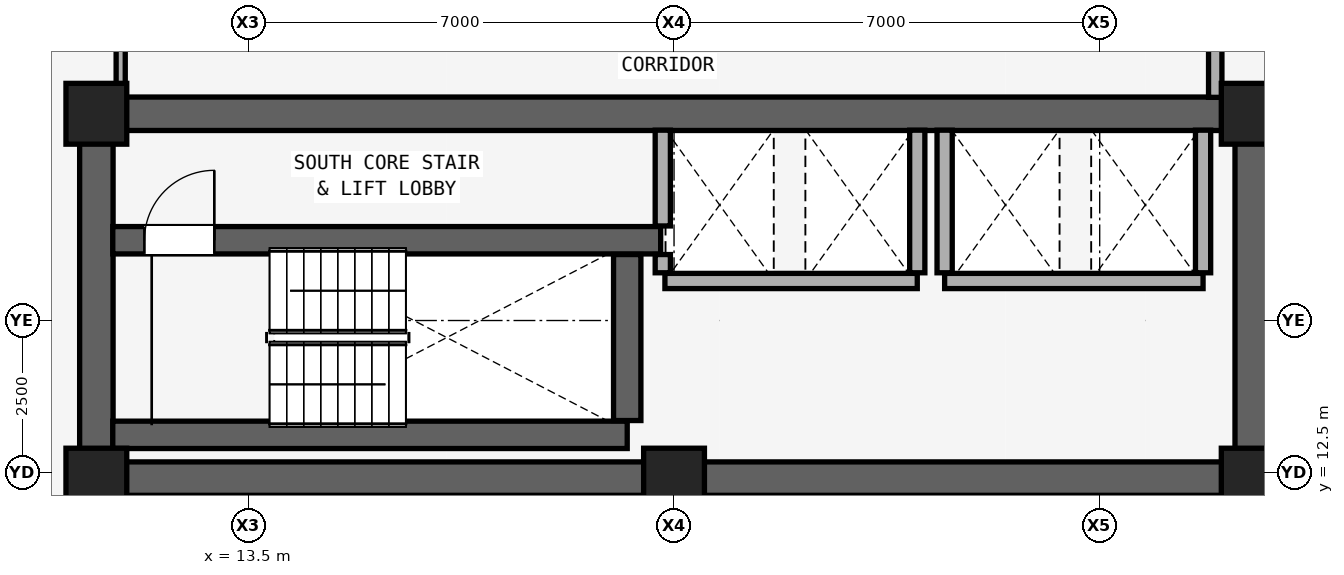
"""IFC4 building model, lengths in metres.
Left out: names, types, materials, properties, quantities, classifications, styles, units other than length and angle.
Written with IfcOpenShell. Run it as: python <this file> out.ifc"""

import sys

from ifc_helpers import new_model, si_unit, direction, frame, frame_2d, origin, origin_2d, place, context, subcontext, project, spatial, rectangle, extrude, element, fill, save


model = new_model("IFC4")
c1 = context("Model", 3, precision=1e-05, world=origin(), true_north=direction((0.0, 1.0)))
c2 = subcontext(c1, "Body", "Model", "MODEL_VIEW")
j1 = project(units=[si_unit("LENGTHUNIT", "METRE"), si_unit("PLANEANGLEUNIT", "RADIAN")], contexts=[c1])
p1 = place(None, origin())
s1 = spatial("IfcSite", under=j1, at=p1, CompositionType="ELEMENT")
p2 = place(p1, origin())
s2 = spatial("IfcBuilding", under=s1, at=p2, CompositionType="ELEMENT")
p3 = place(p2, frame((0.0, 0.0, 147.8)))
s3 = spatial("IfcBuildingStorey", under=s2, at=p3, CompositionType="ELEMENT", Elevation=147.8)
for number, where, z_axis, x_axis in (
    (1, (11.0, 12.4, 0.0), (0.0, 0.0, 1.0), (1.0, 0.0, 0.0)),
    (2, (20.5, 12.4, 0.0), (0.0, 0.0, 1.0), (1.0, 0.0, 0.0)),
    (3, (30.0, 12.4, 0.0), (0.0, 0.0, 1.0), (1.0, 0.0, 0.0)),
    (4, (11.0, 18.4, 0.0), (0.0, 0.0, 1.0), (1.0, 0.0, 0.0)),
    (5, (30.0, 18.4, 0.0), (0.0, 0.0, 1.0), (1.0, 0.0, 0.0)),
):
    element("IfcColumn", number, at=place(p3, frame(where, z_axis=z_axis, x_axis=x_axis)), inside=s3, PredefinedType="COLUMN", context=c2, shape_type="SweptSolid", body=[
        extrude(rectangle(XDim=1.0, YDim=1.0, at=origin_2d()), origin(), (0.0, 0.0, 1.0), 6.6),
    ])
p4 = place(p3, frame((11.0, 12.4, 0.0), z_axis=(0.0, 0.0, 1.0), x_axis=(1.0, 0.0, 0.0)))
e6 = element("IfcWall", 6, at=p4, inside=s3, PredefinedType="SHEAR", context=c2, shape_type="SweptSolid", body=[
    extrude(rectangle(XDim=19.0, YDim=0.55, at=frame_2d((9.5, 0.0))), origin(), (0.0, 0.0, 1.0), 6.4),
])
for number, where, z_axis, x_axis in (
    (7, (11.0, 12.4, 0.0), (0.0, 0.0, 1.0), (0.0, 1.0, 0.0)),
    (8, (30.0, 12.4, 0.0), (0.0, 0.0, 1.0), (0.0, 1.0, 0.0)),
):
    element("IfcWall", number, at=place(p3, frame(where, z_axis=z_axis, x_axis=x_axis)), inside=s3, PredefinedType="SHEAR", context=c2, shape_type="SweptSolid", body=[
        extrude(rectangle(XDim=6.0, YDim=0.55, at=frame_2d((3.0, 0.0))), origin(), (0.0, 0.0, 1.0), 6.4),
    ])
p5 = place(p3, frame((11.0, 18.4, 0.0), z_axis=(0.0, 0.0, 1.0), x_axis=(1.0, 0.0, 0.0)))
e9 = element("IfcWall", 9, at=p5, inside=s3, PredefinedType="SHEAR", context=c2, shape_type="SweptSolid", body=[
    extrude(rectangle(XDim=19.0, YDim=0.55, at=frame_2d((9.5, 0.0))), origin(), (0.0, 0.0, 1.0), 6.4),
])
p6 = place(p3, frame((11.27, 13.12, 0.0), z_axis=(0.0, 0.0, 1.0), x_axis=(1.0, 0.0, 0.0)))
e10 = element("IfcWall", 10, at=p6, inside=s3, PredefinedType="SHEAR", context=c2, shape_type="SweptSolid", body=[
    extrude(rectangle(XDim=8.46, YDim=0.45, at=frame_2d((4.23, 0.0))), origin(), (0.0, 0.0, 1.0), 6.4),
])
p7 = place(p3, frame((20.35, 15.65, 0.0), z_axis=(0.0, 0.0, 1.0), x_axis=(1.0, 0.0, 0.0)))
e11 = element("IfcWall", 11, at=p7, inside=s3, PredefinedType="SOLIDWALL", context=c2, shape_type="SweptSolid", body=[
    extrude(rectangle(XDim=4.15, YDim=0.25, at=frame_2d((2.075, 0.0))), origin(), (0.0, 0.0, 1.0), 6.4),
])
p8 = place(p3, frame((24.95, 15.65, 0.0), z_axis=(0.0, 0.0, 1.0), x_axis=(1.0, 0.0, 0.0)))
e12 = element("IfcWall", 12, at=p8, inside=s3, PredefinedType="SOLIDWALL", context=c2, shape_type="SweptSolid", body=[
    extrude(rectangle(XDim=4.25, YDim=0.25, at=frame_2d((2.125, 0.0))), origin(), (0.0, 0.0, 1.0), 6.4),
])
p9 = place(p3, frame((11.27, 16.32, 0.0), z_axis=(0.0, 0.0, 1.0), x_axis=(1.0, 0.0, 0.0)))
e13 = element("IfcWall", 13, at=p9, inside=s3, PredefinedType="SHEAR", context=c2, shape_type="SweptSolid", body=[
    extrude(rectangle(XDim=9.01, YDim=0.45, at=frame_2d((4.505, 0.0))), origin(), (0.0, 0.0, 1.0), 6.4),
])
p10 = place(p9, frame((0.52, 0.0, 0.0)))
e14 = element("IfcOpeningElement", 14, at=p10, cuts=e13, PredefinedType="OPENING", context=c2, shape_type="SweptSolid", body=[
    extrude(rectangle(XDim=1.15, YDim=2.2, at=frame_2d((0.575, 1.1))), frame((0.0, 0.235, 0.0), z_axis=(0.0, -1.0, 0.0), x_axis=(1.0, 0.0, 0.0)), (0.0, 0.0, 1.0), 0.47),
])
p11 = place(p3, frame((11.4, 18.67, 0.0), z_axis=(0.0, 0.0, 1.0), x_axis=(0.0, 1.0, 0.0)))
e15 = element("IfcWall", 15, at=p11, inside=s3, PredefinedType="PARTITIONING", context=c2, shape_type="SweptSolid", body=[
    extrude(rectangle(XDim=1.945, YDim=0.15, at=frame_2d((0.973, 0.0))), origin(), (0.0, 0.0, 1.0), 6.4),
])
p12 = place(p3, frame((19.73, 13.355, 0.0), z_axis=(0.0, 0.0, 1.0), x_axis=(0.0, 1.0, 0.0)))
e16 = element("IfcWall", 16, at=p12, inside=s3, PredefinedType="SHEAR", context=c2, shape_type="SweptSolid", body=[
    extrude(rectangle(XDim=2.73, YDim=0.45, at=frame_2d((1.365, 0.0))), origin(), (0.0, 0.0, 1.0), 6.4),
])
p13 = place(p3, frame((20.315, 15.785, 0.0), z_axis=(0.0, 0.0, 1.0), x_axis=(0.0, 1.0, 0.0)))
e17 = element("IfcWall", 17, at=p13, inside=s3, PredefinedType="SOLIDWALL", context=c2, shape_type="SweptSolid", body=[
    extrude(rectangle(XDim=0.3, YDim=0.25, at=frame_2d((0.15, 0.0))), origin(), (0.0, 0.0, 1.0), 6.4),
])
p14 = place(p3, frame((20.315, 16.555, 0.0), z_axis=(0.0, 0.0, 1.0), x_axis=(0.0, 1.0, 0.0)))
e18 = element("IfcWall", 18, at=p14, inside=s3, PredefinedType="SOLIDWALL", context=c2, shape_type="SweptSolid", body=[
    extrude(rectangle(XDim=1.575, YDim=0.25, at=frame_2d((0.788, 0.0))), origin(), (0.0, 0.0, 1.0), 6.4),
])
for number, where, z_axis, x_axis in (
    (19, (24.5, 15.785, 0.0), (0.0, 0.0, 1.0), (0.0, 1.0, 0.0)),
    (20, (24.95, 15.785, 0.0), (0.0, 0.0, 1.0), (0.0, 1.0, 0.0)),
    (21, (29.2, 15.785, 0.0), (0.0, 0.0, 1.0), (0.0, 1.0, 0.0)),
):
    element("IfcWall", number, at=place(p3, frame(where, z_axis=z_axis, x_axis=x_axis)), inside=s3, PredefinedType="SOLIDWALL", context=c2, shape_type="SweptSolid", body=[
        extrude(rectangle(XDim=2.345, YDim=0.25, at=frame_2d((1.172, 0.0))), origin(), (0.0, 0.0, 1.0), 6.4),
    ])
p15 = place(p3, frame((29.4, 18.67, 0.0), z_axis=(0.0, 0.0, 1.0), x_axis=(0.0, 1.0, 0.0)))
e22 = element("IfcWall", 22, at=p15, inside=s3, PredefinedType="SOLIDWALL", context=c2, shape_type="SweptSolid", body=[
    extrude(rectangle(XDim=1.945, YDim=0.22, at=frame_2d((0.973, 0.0))), origin(), (0.0, 0.0, 1.0), 6.4),
])
p16 = place(p10, origin())
e23 = element("IfcDoor", 23, at=p16, inside=s3, OperationType="SINGLE_SWING_RIGHT", PredefinedType="DOOR", context=c2, shape_type="SweptSolid", body=[
    extrude(rectangle(XDim=1.15, YDim=2.2, at=frame_2d((0.575, 1.1))), frame((0.0, 0.025, 0.0), z_axis=(0.0, -1.0, 0.0), x_axis=(1.0, 0.0, 0.0)), (0.0, 0.0, 1.0), 0.05),
])
fill(e14, e23)
save(model, sys.argv[1])
